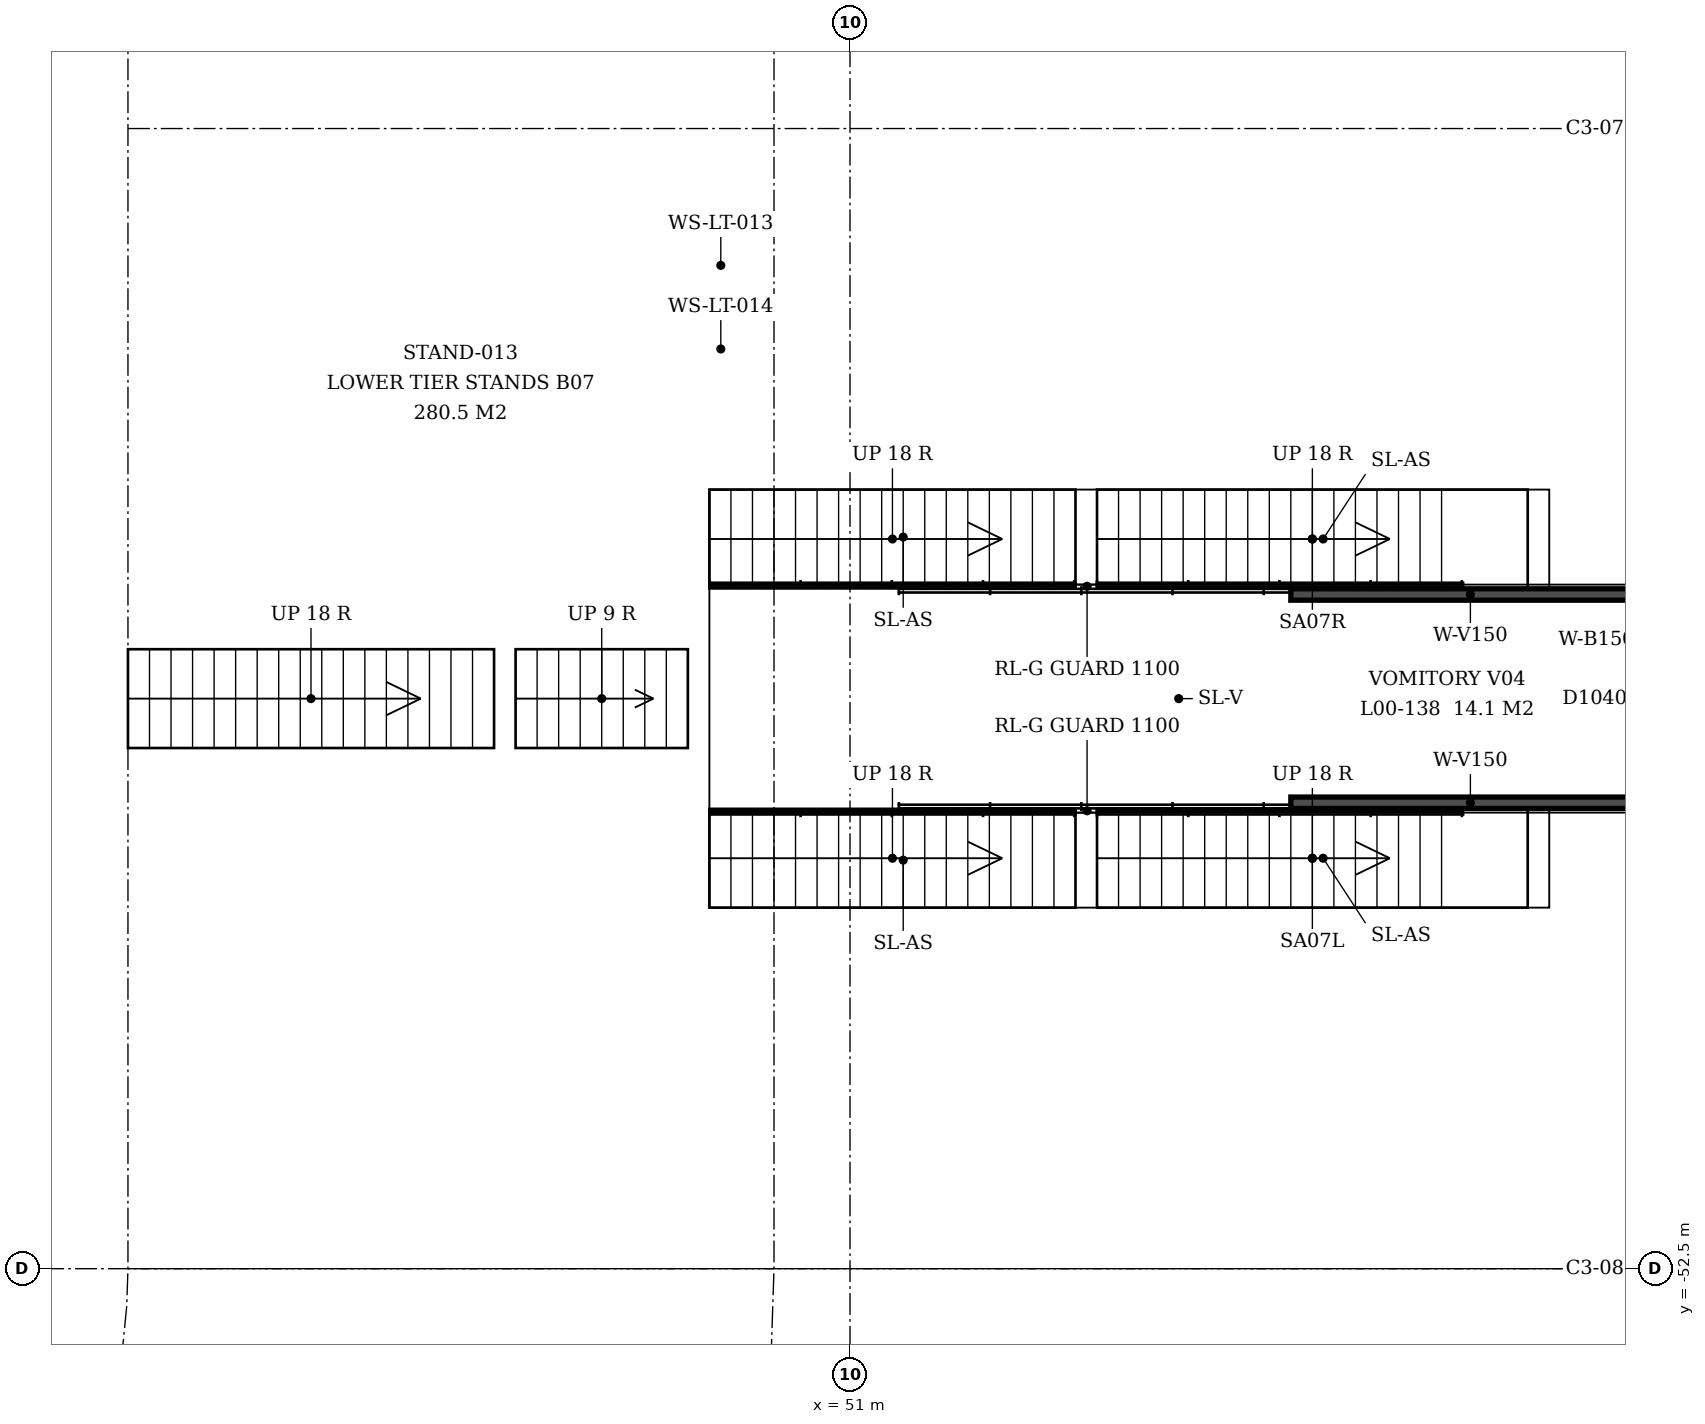
"""IFC4 building model, lengths in metres.
Left out: names, types, materials, properties, quantities, classifications, styles, units other than length and angle.
Written with IfcOpenShell. Run it as: python <this file> out.ifc"""

import sys

from ifc_helpers import new_model, si_unit, direction, frame, frame_2d, origin, place, context, subcontext, project, spatial, rectangle, extrude, element, save


model = new_model("IFC4")
c1 = context("Model", 3, precision=1e-05, world=origin(), true_north=direction((0.0, 1.0)))
c2 = subcontext(c1, "Body", "Model", "MODEL_VIEW")
j1 = project(units=[si_unit("LENGTHUNIT", "METRE"), si_unit("PLANEANGLEUNIT", "RADIAN")], contexts=[c1])
p1 = place(None, origin())
s1 = spatial("IfcSite", under=j1, at=p1, CompositionType="ELEMENT")
p2 = place(p1, origin())
s2 = spatial("IfcBuilding", under=s1, at=p2, CompositionType="ELEMENT")
p3 = place(p2, origin())
s3 = spatial("IfcBuildingStorey", under=s2, at=p3, CompositionType="ELEMENT", Elevation=0.0)
p4 = place(p3, frame((61.5, -53.0, 0.0), z_axis=(0.0, 0.0, 1.0), x_axis=(-0.195081244333, -0.980787086023, 0.0)))
e1 = element("IfcWall", 1, at=p4, inside=s3, PredefinedType="SOLIDWALL", context=c2, shape_type="SweptSolid", body=[
    extrude(rectangle(XDim=9.8, YDim=0.15, at=frame_2d((4.9, 0.0))), origin(), (0.0, 0.0, 1.0), 3.0),
])
for number, where, z_axis, x_axis in (
    (2, (56.8, -46.37, 0.0), (0.0, 0.0, 1.0), (1.0, 0.0, 0.0)),
    (3, (56.8, -43.63, 0.0), (0.0, 0.0, 1.0), (1.0, 0.0, 0.0)),
):
    element("IfcWall", number, at=place(p3, frame(where, z_axis=z_axis, x_axis=x_axis)), inside=s3, PredefinedType="SOLIDWALL", context=c2, shape_type="SweptSolid", body=[
        extrude(rectangle(XDim=4.725, YDim=0.15, at=frame_2d((2.362, 0.0))), origin(), (0.0, 0.0, 1.0), 2.75),
    ])
save(model, sys.argv[1])
